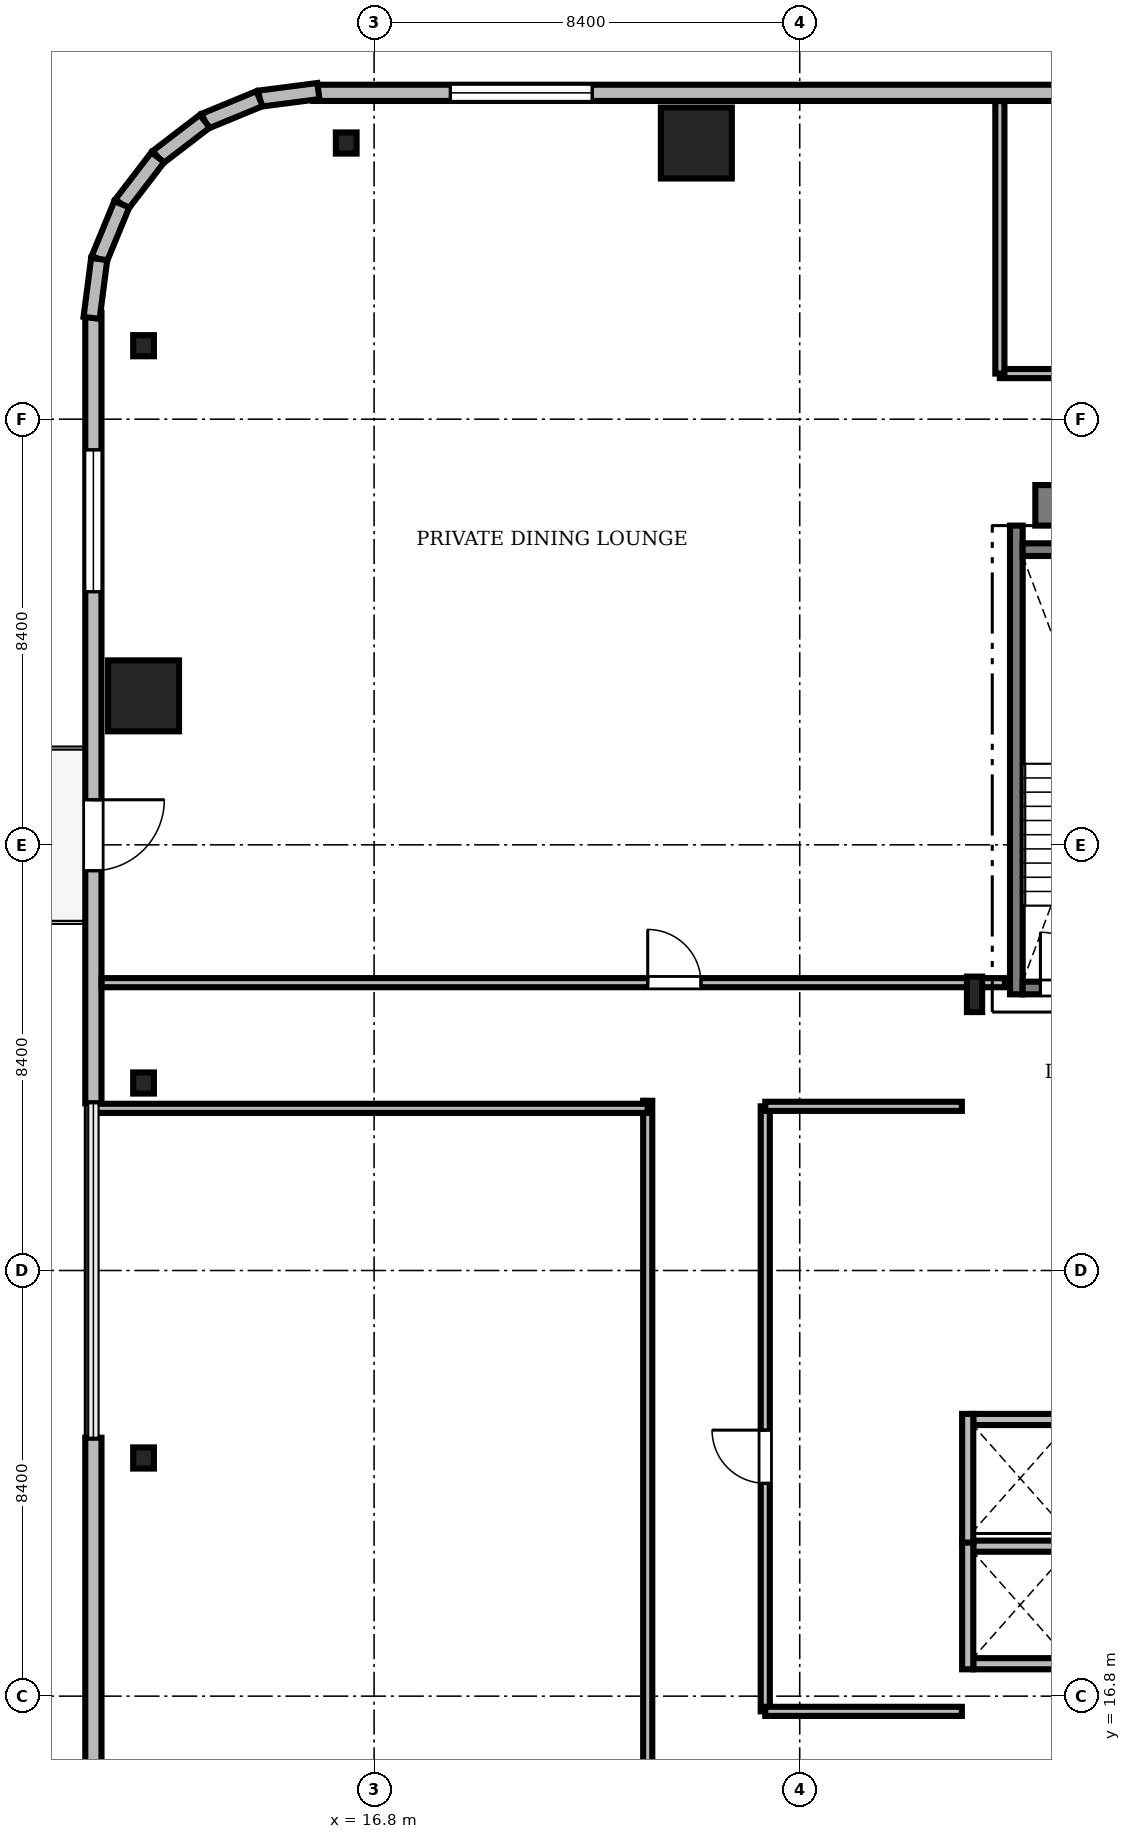
"""IFC4 building model, lengths in metres.
Left out: names, types, materials, properties, quantities, classifications, styles, units other than length and angle.
Written with IfcOpenShell. Run it as: python <this file> out.ifc"""

import sys

from ifc_helpers import new_model, si_unit, direction, frame, frame_2d, origin, origin_2d, place, context, subcontext, project, spatial, rectangle, i_section, extrude, source, transform, mapped, element, fill, save


model = new_model("IFC4")
c1 = context("Model", 3, precision=1e-05, world=origin(), true_north=direction((0.0, 1.0)))
c2 = subcontext(c1, "Body", "Model", "MODEL_VIEW")
j1 = project(units=[si_unit("LENGTHUNIT", "METRE"), si_unit("PLANEANGLEUNIT", "RADIAN")], contexts=[c1])
p1 = place(None, origin())
s1 = spatial("IfcSite", under=j1, at=p1, CompositionType="ELEMENT")
p2 = place(p1, origin())
s2 = spatial("IfcBuilding", under=s1, at=p2, CompositionType="ELEMENT")
p3 = place(p2, frame((0.0, 0.0, 188.55)))
s3 = spatial("IfcBuildingStorey", under=s2, at=p3, CompositionType="ELEMENT", Elevation=188.55)
m1 = source(origin(), c2, "Body", "SweptSolid", [
    extrude(rectangle(XDim=17.52, YDim=0.8, at=frame_2d((8.76, 0.0))), origin(), (0.0, 0.0, 1.0), 3.53),
])
p4 = place(p3, frame((29.85, 40.3, 0.0), z_axis=(0.0, 0.0, 1.0), x_axis=(1.0, 0.0, 0.0)))
e1 = element("IfcWall", 1, at=p4, inside=s3, PredefinedType="SHEAR", context=c2, shape_type="MappedRepresentation", body=[
    mapped(m1, transform((0.0, 0.0, 0.0), scale=1.0)),
])
m2 = source(origin(), c2, "Body", "SweptSolid", [
    extrude(i_section(OverallWidth=0.3, OverallDepth=0.7, WebThickness=0.017, FlangeThickness=0.032, FilletRadius=0.027, at=origin_2d()), origin(), (0.0, 0.0, 1.0), 3.53),
])
p5 = place(p3, frame((28.65, 30.65, 0.0), z_axis=(0.0, 0.0, 1.0), x_axis=(1.0, 0.0, 0.0)))
e2 = element("IfcColumn", 2, at=p5, inside=s3, PredefinedType="COLUMN", context=c2, shape_type="MappedRepresentation", body=[
    mapped(m2, transform((0.0, 0.0, 0.0), scale=1.0)),
])
m3 = source(origin(), c2, "Body", "SweptSolid", [
    extrude(rectangle(XDim=1.4, YDim=1.4, at=origin_2d()), origin(), (0.0, 0.0, 1.0), 3.53),
])
for number, where, z_axis, x_axis in (
    (3, (23.16, 47.45, 0.0), (0.0, 0.0, 1.0), (1.0, 0.0, 0.0)),
    (4, (12.25, 36.54, 0.0), (0.0, 0.0, 1.0), (1.0, 0.0, 0.0)),
):
    element("IfcColumn", number, at=place(p3, frame(where, z_axis=z_axis, x_axis=x_axis)), inside=s3, PredefinedType="COLUMN", context=c2, shape_type="MappedRepresentation", body=[
        mapped(m3, transform((0.0, 0.0, 0.0), scale=1.0)),
    ])
m4 = source(origin(), c2, "Body", "SweptSolid", [
    extrude(i_section(OverallWidth=0.409, OverallDepth=0.417, WebThickness=0.021, FlangeThickness=0.033, FilletRadius=0.015, at=origin_2d()), origin(), (0.0, 0.0, 1.0), 3.53),
])
for number, where, z_axis, x_axis in (
    (5, (16.25, 47.45, 0.0), (0.0, 0.0, 1.0), (1.0, 0.0, 0.0)),
    (6, (12.25, 43.45, 0.0), (0.0, 0.0, 1.0), (1.0, 0.0, 0.0)),
    (7, (12.25, 28.9, 0.0), (0.0, 0.0, 1.0), (1.0, 0.0, 0.0)),
    (8, (12.25, 21.5, 0.0), (0.0, 0.0, 1.0), (1.0, 0.0, 0.0)),
):
    element("IfcColumn", number, at=place(p3, frame(where, z_axis=z_axis, x_axis=x_axis)), inside=s3, PredefinedType="COLUMN", context=c2, shape_type="MappedRepresentation", body=[
        mapped(m4, transform((0.0, 0.0, 0.0), scale=1.0)),
    ])
m5 = source(origin(), c2, "Body", "SweptSolid", [
    extrude(rectangle(XDim=15.6, YDim=0.32, at=frame_2d((7.8, 0.0))), origin(), (0.0, 0.0, 1.0), 3.53),
])
p6 = place(p3, frame((31.2, 48.44, 0.0), z_axis=(0.0, 0.0, 1.0), x_axis=(-1.0, 0.0, 0.0)))
e9 = element("IfcWall", 9, at=p6, inside=s3, PredefinedType="SOLIDWALL", context=c2, shape_type="MappedRepresentation", body=[
    mapped(m5, transform((0.0, 0.0, 0.0), scale=1.0)),
])
m6 = source(origin(), c2, "Body", "SweptSolid", [
    extrude(rectangle(XDim=2.8, YDim=2.4, at=frame_2d((1.4, 1.2))), frame((0.0, 0.17, 0.0), z_axis=(0.0, -1.0, 0.0), x_axis=(1.0, 0.0, 0.0)), (0.0, 0.0, 1.0), 0.34),
])
p7 = place(p6, frame((10.095, 0.0, 0.72)))
e10 = element("IfcOpeningElement", 10, at=p7, cuts=e9, PredefinedType="OPENING", context=c2, shape_type="MappedRepresentation", body=[
    mapped(m6, transform((0.0, 0.0, 0.0), scale=1.0)),
])
m7 = source(origin(), c2, "Body", "SweptSolid", [
    extrude(rectangle(XDim=15.6, YDim=0.32, at=frame_2d((7.8, 0.0))), origin(), (0.0, 0.0, 1.0), 3.53),
])
p8 = place(p3, frame((11.26, 44.1, 0.0), z_axis=(0.0, 0.0, 1.0), x_axis=(0.0, -1.0, 0.0)))
e11 = element("IfcWall", 11, at=p8, inside=s3, PredefinedType="SOLIDWALL", context=c2, shape_type="MappedRepresentation", body=[
    mapped(m7, transform((0.0, 0.0, 0.0), scale=1.0)),
])
m8 = source(origin(), c2, "Body", "SweptSolid", [
    extrude(rectangle(XDim=1.4, YDim=2.3, at=frame_2d((0.7, 1.15))), frame((0.0, 0.17, 0.0), z_axis=(0.0, -1.0, 0.0), x_axis=(1.0, 0.0, 0.0)), (0.0, 0.0, 1.0), 0.34),
])
p9 = place(p8, frame((9.61, 0.0, 0.0)))
e12 = element("IfcOpeningElement", 12, at=p9, cuts=e11, PredefinedType="OPENING", context=c2, shape_type="MappedRepresentation", body=[
    mapped(m8, transform((0.0, 0.0, 0.0), scale=1.0)),
])
p10 = place(p8, frame((2.705, 0.0, 0.72)))
e13 = element("IfcOpeningElement", 13, at=p10, cuts=e11, PredefinedType="OPENING", context=c2, shape_type="MappedRepresentation", body=[
    mapped(m6, transform((0.0, 0.0, 0.0), scale=1.0)),
])
p11 = place(p3, frame((11.26, 21.9, 0.0), z_axis=(0.0, 0.0, 1.0), x_axis=(0.0, -1.0, 0.0)))
e14 = element("IfcWall", 14, at=p11, inside=s3, PredefinedType="SOLIDWALL", context=c2, shape_type="MappedRepresentation", body=[
    mapped(m5, transform((0.0, 0.0, 0.0), scale=1.0)),
])
p12 = place(p11, frame((10.095, 0.0, 0.72)))
e15 = element("IfcOpeningElement", 15, at=p12, cuts=e14, PredefinedType="OPENING", context=c2, shape_type="MappedRepresentation", body=[
    mapped(m6, transform((0.0, 0.0, 0.0), scale=1.0)),
])
m9 = source(origin(), c2, "Body", "SweptSolid", [
    extrude(rectangle(XDim=1.17, YDim=0.32, at=frame_2d((0.585, 0.0))), origin(), (0.0, 0.0, 1.0), 3.53),
])
p13 = place(p3, frame((15.7, 48.476, 0.0), z_axis=(0.0, 0.0, 1.0), x_axis=(-0.991735963317, -0.128295670475, 0.0)))
e16 = element("IfcWall", 16, at=p13, inside=s3, PredefinedType="SOLIDWALL", context=c2, shape_type="MappedRepresentation", body=[
    mapped(m9, transform((0.0, 0.0, 0.0), scale=1.0)),
])
m10 = source(origin(), c2, "Body", "SweptSolid", [
    extrude(rectangle(XDim=1.169, YDim=0.32, at=frame_2d((0.584, 0.0))), origin(), (0.0, 0.0, 1.0), 3.53),
])
p14 = place(p3, frame((14.54, 48.325, 0.0), z_axis=(0.0, 0.0, 1.0), x_axis=(-0.924552646638, -0.381054331552, 0.0)))
e17 = element("IfcWall", 17, at=p14, inside=s3, PredefinedType="SOLIDWALL", context=c2, shape_type="MappedRepresentation", body=[
    mapped(m10, transform((0.0, 0.0, 0.0), scale=1.0)),
])
m11 = source(origin(), c2, "Body", "SweptSolid", [
    extrude(rectangle(XDim=1.169, YDim=0.32, at=frame_2d((0.584, 0.0))), origin(), (0.0, 0.0, 1.0), 3.53),
])
p15 = place(p3, frame((13.459, 47.88, 0.0), z_axis=(0.0, 0.0, 1.0), x_axis=(-0.793663520347, -0.608356981114, 0.0)))
e18 = element("IfcWall", 18, at=p15, inside=s3, PredefinedType="SOLIDWALL", context=c2, shape_type="MappedRepresentation", body=[
    mapped(m11, transform((0.0, 0.0, 0.0), scale=1.0)),
])
m12 = source(origin(), c2, "Body", "SweptSolid", [
    extrude(rectangle(XDim=1.169, YDim=0.32, at=frame_2d((0.584, 0.0))), origin(), (0.0, 0.0, 1.0), 3.53),
])
p16 = place(p3, frame((12.531, 47.169, 0.0), z_axis=(0.0, 0.0, 1.0), x_axis=(-0.608387696831, -0.793639975269, 0.0)))
e19 = element("IfcWall", 19, at=p16, inside=s3, PredefinedType="SOLIDWALL", context=c2, shape_type="MappedRepresentation", body=[
    mapped(m12, transform((0.0, 0.0, 0.0), scale=1.0)),
])
p17 = place(p3, frame((11.82, 46.241, 0.0), z_axis=(0.0, 0.0, 1.0), x_axis=(-0.381054331552, -0.924552646638, 0.0)))
e20 = element("IfcWall", 20, at=p17, inside=s3, PredefinedType="SOLIDWALL", context=c2, shape_type="MappedRepresentation", body=[
    mapped(m10, transform((0.0, 0.0, 0.0), scale=1.0)),
])
p18 = place(p3, frame((11.375, 45.16, 0.0), z_axis=(0.0, 0.0, 1.0), x_axis=(-0.128295670475, -0.991735963317, 0.0)))
e21 = element("IfcWall", 21, at=p18, inside=s3, PredefinedType="SOLIDWALL", context=c2, shape_type="MappedRepresentation", body=[
    mapped(m9, transform((0.0, 0.0, 0.0), scale=1.0)),
])
m13 = source(origin(), c2, "Body", "SweptSolid", [
    extrude(rectangle(XDim=9.25, YDim=0.25, at=frame_2d((4.625, 0.0))), origin(), (0.0, 0.0, 1.0), 3.55),
])
p19 = place(p3, frame((29.475, 30.65, 0.0), z_axis=(0.0, 0.0, 1.0), x_axis=(0.0, 1.0, 0.0)))
e22 = element("IfcWall", 22, at=p19, inside=s3, PredefinedType="SOLIDWALL", context=c2, shape_type="MappedRepresentation", body=[
    mapped(m13, transform((0.0, 0.0, 0.0), scale=1.0)),
])
m14 = source(origin(), c2, "Body", "SweptSolid", [
    extrude(rectangle(XDim=3.15, YDim=0.25, at=frame_2d((1.575, 0.0))), origin(), (0.0, 0.0, 1.0), 3.55),
])
p20 = place(p3, frame((29.6, 39.425, 0.0), z_axis=(0.0, 0.0, 1.0), x_axis=(1.0, 0.0, 0.0)))
e23 = element("IfcWall", 23, at=p20, inside=s3, PredefinedType="SOLIDWALL", context=c2, shape_type="MappedRepresentation", body=[
    mapped(m14, transform((0.0, 0.0, 0.0), scale=1.0)),
])
p21 = place(p3, frame((29.6, 30.775, 0.0), z_axis=(0.0, 0.0, 1.0), x_axis=(1.0, 0.0, 0.0)))
e24 = element("IfcWall", 24, at=p21, inside=s3, PredefinedType="SOLIDWALL", context=c2, shape_type="MappedRepresentation", body=[
    mapped(m14, transform((0.0, 0.0, 0.0), scale=1.0)),
])
m15 = source(origin(), c2, "Body", "SweptSolid", [
    extrude(rectangle(XDim=1.1, YDim=2.2, at=frame_2d((0.55, 1.1))), frame((0.0, 0.135, 0.0), z_axis=(0.0, -1.0, 0.0), x_axis=(1.0, 0.0, 0.0)), (0.0, 0.0, 1.0), 0.27),
])
p22 = place(p21, frame((0.35, 0.0, 0.0)))
e25 = element("IfcOpeningElement", 25, at=p22, cuts=e24, PredefinedType="OPENING", context=c2, shape_type="MappedRepresentation", body=[
    mapped(m15, transform((0.0, 0.0, 0.0), scale=1.0)),
])
m16 = source(origin(), c2, "Body", "SweptSolid", [
    extrude(rectangle(XDim=1.85, YDim=0.22, at=frame_2d((0.925, 0.0))), origin(), (0.0, 0.0, 1.0), 2.972),
])
p23 = place(p3, frame((28.625, 17.44, 0.0), z_axis=(0.0, 0.0, 1.0), x_axis=(1.0, 0.0, 0.0)))
e26 = element("IfcWall", 26, at=p23, inside=s3, PredefinedType="SOLIDWALL", context=c2, shape_type="MappedRepresentation", body=[
    mapped(m16, transform((0.0, 0.0, 0.0), scale=1.0)),
])
m17 = source(origin(), c2, "Body", "SweptSolid", [
    extrude(rectangle(XDim=1.85, YDim=0.22, at=frame_2d((0.925, 0.0))), origin(), (0.0, 0.0, 1.0), 3.53),
])
p24 = place(p3, frame((28.625, 19.76, 0.0), z_axis=(0.0, 0.0, 1.0), x_axis=(1.0, 0.0, 0.0)))
e27 = element("IfcWall", 27, at=p24, inside=s3, PredefinedType="SOLIDWALL", context=c2, shape_type="MappedRepresentation", body=[
    mapped(m17, transform((0.0, 0.0, 0.0), scale=1.0)),
])
m18 = source(origin(), c2, "Body", "SweptSolid", [
    extrude(rectangle(XDim=2.54, YDim=0.22, at=frame_2d((1.27, 0.0))), origin(), (0.0, 0.0, 1.0), 2.972),
])
p25 = place(p3, frame((28.515, 17.33, 0.0), z_axis=(0.0, 0.0, 1.0), x_axis=(0.0, 1.0, 0.0)))
e28 = element("IfcWall", 28, at=p25, inside=s3, PredefinedType="SOLIDWALL", context=c2, shape_type="MappedRepresentation", body=[
    mapped(m18, transform((0.0, 0.0, 0.0), scale=1.0)),
])
p26 = place(p3, frame((28.625, 22.26, 0.0), z_axis=(0.0, 0.0, 1.0), x_axis=(1.0, 0.0, 0.0)))
e29 = element("IfcWall", 29, at=p26, inside=s3, PredefinedType="SOLIDWALL", context=c2, shape_type="MappedRepresentation", body=[
    mapped(m17, transform((0.0, 0.0, 0.0), scale=1.0)),
])
m19 = source(origin(), c2, "Body", "SweptSolid", [
    extrude(rectangle(XDim=2.54, YDim=0.22, at=frame_2d((1.27, 0.0))), origin(), (0.0, 0.0, 1.0), 3.53),
])
p27 = place(p3, frame((28.515, 19.83, 0.0), z_axis=(0.0, 0.0, 1.0), x_axis=(0.0, 1.0, 0.0)))
e30 = element("IfcWall", 30, at=p27, inside=s3, PredefinedType="SOLIDWALL", context=c2, shape_type="MappedRepresentation", body=[
    mapped(m19, transform((0.0, 0.0, 0.0), scale=1.0)),
])
m20 = source(origin(), c2, "Body", "SweptSolid", [
    extrude(rectangle(XDim=28.428, YDim=0.18, at=frame_2d((14.214, 0.0))), origin(), (0.0, 0.0, 1.0), 2.772),
])
p28 = place(p3, frame((29.15, 42.9, 0.0), z_axis=(0.0, 0.0, 1.0), x_axis=(1.0, 0.0, 0.0)))
e31 = element("IfcWall", 31, at=p28, inside=s3, PredefinedType="PARTITIONING", context=c2, shape_type="MappedRepresentation", body=[
    mapped(m20, transform((0.0, 0.0, 0.0), scale=1.0)),
])
m21 = source(origin(), c2, "Body", "SweptSolid", [
    extrude(rectangle(XDim=1.05, YDim=2.2, at=frame_2d((0.525, 1.1))), frame((0.0, 0.1, 0.0), z_axis=(0.0, -1.0, 0.0), x_axis=(1.0, 0.0, 0.0)), (0.0, 0.0, 1.0), 0.2),
])
p29 = place(p28, frame((4.5, 0.0, 0.0)))
e32 = element("IfcOpeningElement", 32, at=p29, cuts=e31, PredefinedType="OPENING", context=c2, shape_type="MappedRepresentation", body=[
    mapped(m21, transform((0.0, 0.0, 0.0), scale=1.0)),
])
m22 = source(origin(), c2, "Body", "SweptSolid", [
    extrude(rectangle(XDim=17.828, YDim=0.18, at=frame_2d((8.914, 0.0))), origin(), (0.0, 0.0, 1.0), 2.772),
])
p30 = place(p3, frame((11.422, 30.88, 0.0), z_axis=(0.0, 0.0, 1.0), x_axis=(1.0, 0.0, 0.0)))
e33 = element("IfcWall", 33, at=p30, inside=s3, PredefinedType="PARTITIONING", context=c2, shape_type="MappedRepresentation", body=[
    mapped(m22, transform((0.0, 0.0, 0.0), scale=1.0)),
])
p31 = place(p30, frame((10.778, 0.0, 0.0)))
e34 = element("IfcOpeningElement", 34, at=p31, cuts=e33, PredefinedType="OPENING", context=c2, shape_type="MappedRepresentation", body=[
    mapped(m21, transform((0.0, 0.0, 0.0), scale=1.0)),
])
m23 = source(origin(), c2, "Body", "SweptSolid", [
    extrude(rectangle(XDim=11.94, YDim=0.18, at=frame_2d((5.97, 0.0))), origin(), (0.0, 0.0, 1.0), 2.972),
])
p32 = place(p3, frame((24.52, 16.5, 0.0), z_axis=(0.0, 0.0, 1.0), x_axis=(0.0, 1.0, 0.0)))
e35 = element("IfcWall", 35, at=p32, inside=s3, PredefinedType="PARTITIONING", context=c2, shape_type="MappedRepresentation", body=[
    mapped(m23, transform((0.0, 0.0, 0.0), scale=1.0)),
])
p33 = place(p32, frame((4.5, 0.0, 0.0)))
e36 = element("IfcOpeningElement", 36, at=p33, cuts=e35, PredefinedType="OPENING", context=c2, shape_type="MappedRepresentation", body=[
    mapped(m21, transform((0.0, 0.0, 0.0), scale=1.0)),
])
m24 = source(origin(), c2, "Body", "SweptSolid", [
    extrude(rectangle(XDim=14.98, YDim=0.18, at=frame_2d((7.49, 0.0))), origin(), (0.0, 0.0, 1.0), 2.972),
])
p34 = place(p3, frame((22.2, 13.57, 0.0), z_axis=(0.0, 0.0, 1.0), x_axis=(0.0, 1.0, 0.0)))
e37 = element("IfcWall", 37, at=p34, inside=s3, PredefinedType="PARTITIONING", context=c2, shape_type="MappedRepresentation", body=[
    mapped(m24, transform((0.0, 0.0, 0.0), scale=1.0)),
])
m25 = source(origin(), c2, "Body", "SweptSolid", [
    extrude(rectangle(XDim=10.97, YDim=0.18, at=frame_2d((5.485, 0.0))), origin(), (0.0, 0.0, 1.0), 2.772),
])
p35 = place(p3, frame((11.23, 28.4, 0.0), z_axis=(0.0, 0.0, 1.0), x_axis=(1.0, 0.0, 0.0)))
e38 = element("IfcWall", 38, at=p35, inside=s3, PredefinedType="PARTITIONING", context=c2, shape_type="MappedRepresentation", body=[
    mapped(m25, transform((0.0, 0.0, 0.0), scale=1.0)),
])
m26 = source(origin(), c2, "Body", "SweptSolid", [
    extrude(rectangle(XDim=5.378, YDim=0.18, at=frame_2d((2.689, 0.0))), origin(), (0.0, 0.0, 1.0), 2.772),
])
p36 = place(p3, frame((29.15, 42.9, 0.0), z_axis=(0.0, 0.0, 1.0), x_axis=(0.0, 1.0, 0.0)))
e39 = element("IfcWall", 39, at=p36, inside=s3, PredefinedType="PARTITIONING", context=c2, shape_type="MappedRepresentation", body=[
    mapped(m26, transform((0.0, 0.0, 0.0), scale=1.0)),
])
m27 = source(origin(), c2, "Body", "SweptSolid", [
    extrude(rectangle(XDim=3.88, YDim=0.18, at=frame_2d((1.94, 0.0))), origin(), (0.0, 0.0, 1.0), 3.53),
])
for number, where, z_axis, x_axis in (
    (40, (24.52, 16.5, 0.0), (0.0, 0.0, 1.0), (1.0, 0.0, 0.0)),
    (41, (24.52, 28.44, 0.0), (0.0, 0.0, 1.0), (1.0, 0.0, 0.0)),
):
    element("IfcWall", number, at=place(p3, frame(where, z_axis=z_axis, x_axis=x_axis)), inside=s3, PredefinedType="PARTITIONING", context=c2, shape_type="MappedRepresentation", body=[
        mapped(m27, transform((0.0, 0.0, 0.0), scale=1.0)),
    ])
m28 = source(origin(), c2, "Body", "SweptSolid", [
    extrude(rectangle(XDim=2.8, YDim=2.4, at=frame_2d((1.4, 1.2))), frame((0.0, 0.03, 0.0), z_axis=(0.0, -1.0, 0.0), x_axis=(1.0, 0.0, 0.0)), (0.0, 0.0, 1.0), 0.06),
])
p37 = place(p7, origin())
e42 = element("IfcWindow", 42, at=p37, inside=s3, PartitioningType="SINGLE_PANEL", PredefinedType="WINDOW", context=c2, shape_type="MappedRepresentation", body=[
    mapped(m28, transform((0.0, 0.0, 0.0), scale=1.0)),
])
fill(e10, e42)
m29 = source(origin(), c2, "Body", "SweptSolid", [
    extrude(rectangle(XDim=1.4, YDim=2.3, at=frame_2d((0.7, 1.15))), frame((0.0, 0.025, 0.0), z_axis=(0.0, -1.0, 0.0), x_axis=(1.0, 0.0, 0.0)), (0.0, 0.0, 1.0), 0.05),
])
p38 = place(p9, frame((1.4, 0.0, 0.0), z_axis=(0.0, 0.0, 1.0), x_axis=(-1.0, 0.0, 0.0)))
e43 = element("IfcDoor", 43, at=p38, inside=s3, OperationType="DOUBLE_DOOR_SLIDING", PredefinedType="DOOR", context=c2, shape_type="MappedRepresentation", body=[
    mapped(m29, transform((0.0, 0.0, 0.0), scale=1.0)),
])
fill(e12, e43)
p39 = place(p10, origin())
e44 = element("IfcWindow", 44, at=p39, inside=s3, PartitioningType="SINGLE_PANEL", PredefinedType="WINDOW", context=c2, shape_type="MappedRepresentation", body=[
    mapped(m28, transform((0.0, 0.0, 0.0), scale=1.0)),
])
fill(e13, e44)
m30 = source(origin(), c2, "Body", "SweptSolid", [
    extrude(rectangle(XDim=1.1, YDim=2.2, at=frame_2d((0.55, 1.1))), frame((0.0, 0.025, 0.0), z_axis=(0.0, -1.0, 0.0), x_axis=(1.0, 0.0, 0.0)), (0.0, 0.0, 1.0), 0.05),
])
p40 = place(p22, origin())
e45 = element("IfcDoor", 45, at=p40, inside=s3, OperationType="SINGLE_SWING_LEFT", PredefinedType="DOOR", context=c2, shape_type="MappedRepresentation", body=[
    mapped(m30, transform((0.0, 0.0, 0.0), scale=1.0)),
])
fill(e25, e45)
m31 = source(origin(), c2, "Body", "SweptSolid", [
    extrude(rectangle(XDim=1.05, YDim=2.2, at=frame_2d((0.525, 1.1))), frame((0.0, 0.025, 0.0), z_axis=(0.0, -1.0, 0.0), x_axis=(1.0, 0.0, 0.0)), (0.0, 0.0, 1.0), 0.05),
])
p41 = place(p31, origin())
e46 = element("IfcDoor", 46, at=p41, inside=s3, OperationType="SINGLE_SWING_LEFT", PredefinedType="DOOR", context=c2, shape_type="MappedRepresentation", body=[
    mapped(m31, transform((0.0, 0.0, 0.0), scale=1.0)),
])
fill(e34, e46)
p42 = place(p33, origin())
e47 = element("IfcDoor", 47, at=p42, inside=s3, OperationType="SINGLE_SWING_RIGHT", PredefinedType="DOOR", context=c2, shape_type="MappedRepresentation", body=[
    mapped(m31, transform((0.0, 0.0, 0.0), scale=1.0)),
])
fill(e36, e47)
save(model, sys.argv[1])
